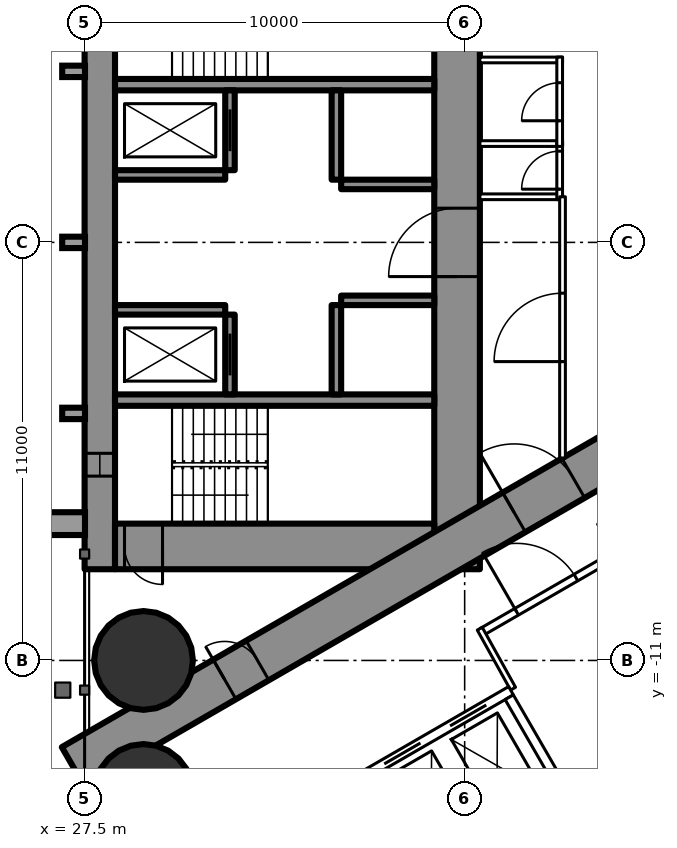
"""IFC4 building model, lengths in metres.
Left out: names, types, materials, properties, quantities, classifications, styles, units other than length and angle.
Written with IfcOpenShell. Run it as: python <this file> out.ifc"""

import sys

from ifc_helpers import new_model, si_unit, direction, frame, frame_2d, origin, origin_2d, place, context, subcontext, project, spatial, rectangle, hollow_circle, extrude, element, fill, save


model = new_model("IFC4")
c1 = context("Model", 3, precision=1e-05, world=origin(), true_north=direction((0.0, 1.0)))
c2 = subcontext(c1, "Body", "Model", "MODEL_VIEW")
j1 = project(units=[si_unit("LENGTHUNIT", "METRE"), si_unit("PLANEANGLEUNIT", "RADIAN")], contexts=[c1])
p1 = place(None, origin())
s1 = spatial("IfcSite", under=j1, at=p1, CompositionType="ELEMENT")
p2 = place(p1, origin())
s2 = spatial("IfcBuilding", under=s1, at=p2, CompositionType="ELEMENT")
p3 = place(p2, frame((0.0, 0.0, 94.1)))
s3 = spatial("IfcBuildingStorey", under=s2, at=p3, CompositionType="ELEMENT", Elevation=94.1)
for number, where, z_axis, x_axis in (
    (1, (29.05, -11.0, 0.0), (0.0, 0.0, 1.0), (1.0, 0.0, 0.0)),
    (2, (29.05, -14.5, 0.0), (0.0, 0.0, 1.0), (1.0, 0.0, 0.0)),
):
    element("IfcColumn", number, at=place(p3, frame(where, z_axis=z_axis, x_axis=x_axis)), inside=s3, PredefinedType="COLUMN", context=c2, shape_type="SweptSolid", body=[
        extrude(hollow_circle(Radius=1.3, WallThickness=0.1, at=origin_2d()), origin(), (0.0, 0.0, 1.0), 3.5),
    ])
p4 = place(p3, frame((27.9, -8.6, 0.0), z_axis=(0.0, 0.0, 1.0), x_axis=(0.0, 1.0, 0.0)))
e3 = element("IfcWall", 3, at=p4, inside=s3, PredefinedType="SHEAR", context=c2, shape_type="SweptSolid", body=[
    extrude(rectangle(XDim=17.2, YDim=0.8, at=frame_2d((8.6, 0.0))), origin(), (0.0, 0.0, 1.0), 3.5),
])
p5 = place(p4, frame((2.45, 0.0, 0.6)))
e4 = element("IfcOpeningElement", 4, at=p5, cuts=e3, PredefinedType="OPENING", context=c2, shape_type="SweptSolid", body=[
    extrude(rectangle(XDim=0.6, YDim=2.1, at=frame_2d((0.3, 1.05))), frame((0.0, 0.41, 0.0), z_axis=(0.0, -1.0, 0.0), x_axis=(1.0, 0.0, 0.0)), (0.0, 0.0, 1.0), 0.82),
])
p6 = place(p4, frame((14.15, 0.0, 0.6)))
e5 = element("IfcOpeningElement", 5, at=p6, cuts=e3, PredefinedType="OPENING", context=c2, shape_type="SweptSolid", body=[
    extrude(rectangle(XDim=0.6, YDim=2.1, at=frame_2d((0.3, 1.05))), frame((0.0, 0.41, 0.0), z_axis=(0.0, -1.0, 0.0), x_axis=(1.0, 0.0, 0.0)), (0.0, 0.0, 1.0), 0.82),
])
p7 = place(p3, frame((37.3, -8.6, 0.0), z_axis=(0.0, 0.0, 1.0), x_axis=(0.0, 1.0, 0.0)))
e6 = element("IfcWall", 6, at=p7, inside=s3, PredefinedType="SHEAR", context=c2, shape_type="SweptSolid", body=[
    extrude(rectangle(XDim=17.2, YDim=1.2, at=frame_2d((8.6, 0.0))), origin(), (0.0, 0.0, 1.0), 3.5),
])
p8 = place(p7, frame((7.7, 0.0, 0.0)))
e7 = element("IfcOpeningElement", 7, at=p8, cuts=e6, PredefinedType="OPENING", context=c2, shape_type="SweptSolid", body=[
    extrude(rectangle(XDim=1.8, YDim=2.2, at=frame_2d((0.9, 1.1))), frame((0.0, 0.61, 0.0), z_axis=(0.0, -1.0, 0.0), x_axis=(1.0, 0.0, 0.0)), (0.0, 0.0, 1.0), 1.22),
])
p9 = place(p3, frame((28.3, -8.0, 0.0), z_axis=(0.0, 0.0, 1.0), x_axis=(1.0, 0.0, 0.0)))
e8 = element("IfcWall", 8, at=p9, inside=s3, PredefinedType="SHEAR", context=c2, shape_type="SweptSolid", body=[
    extrude(rectangle(XDim=8.4, YDim=1.2, at=frame_2d((4.2, 0.0))), origin(), (0.0, 0.0, 1.0), 3.5),
])
p10 = place(p9, frame((0.25, 0.0, 0.0)))
e9 = element("IfcOpeningElement", 9, at=p10, cuts=e8, PredefinedType="OPENING", context=c2, shape_type="SweptSolid", body=[
    extrude(rectangle(XDim=1.0, YDim=2.2, at=frame_2d((0.5, 1.1))), frame((0.0, 0.61, 0.0), z_axis=(0.0, -1.0, 0.0), x_axis=(1.0, 0.0, 0.0)), (0.0, 0.0, 1.0), 1.22),
])
for number, where, z_axis, x_axis in (
    (10, (28.3, -4.15, 0.0), (0.0, 0.0, 1.0), (1.0, 0.0, 0.0)),
    (11, (28.3, 4.15, 0.0), (0.0, 0.0, 1.0), (1.0, 0.0, 0.0)),
):
    element("IfcWall", number, at=place(p3, frame(where, z_axis=z_axis, x_axis=x_axis)), inside=s3, PredefinedType="SHEAR", context=c2, shape_type="SweptSolid", body=[
        extrude(rectangle(XDim=8.4, YDim=0.3, at=frame_2d((4.2, 0.0))), origin(), (0.0, 0.0, 1.0), 3.5),
    ])
p11 = place(p3, frame((31.325, -4.0, 0.0), z_axis=(0.0, 0.0, 1.0), x_axis=(0.0, 1.0, 0.0)))
e12 = element("IfcWall", 12, at=p11, inside=s3, PredefinedType="SHEAR", context=c2, shape_type="SweptSolid", body=[
    extrude(rectangle(XDim=2.1, YDim=0.25, at=frame_2d((1.05, 0.0))), origin(), (0.0, 0.0, 1.0), 3.5),
])
p12 = place(p11, frame((0.5, 0.0, 0.0)))
e13 = element("IfcOpeningElement", 13, at=p12, cuts=e12, PredefinedType="OPENING", context=c2, shape_type="SweptSolid", body=[
    extrude(rectangle(XDim=1.1, YDim=2.2, at=frame_2d((0.55, 1.1))), frame((0.0, 0.135, 0.0), z_axis=(0.0, -1.0, 0.0), x_axis=(1.0, 0.0, 0.0)), (0.0, 0.0, 1.0), 0.27),
])
p13 = place(p3, frame((34.125, -4.0, 0.0), z_axis=(0.0, 0.0, 1.0), x_axis=(0.0, 1.0, 0.0)))
e14 = element("IfcWall", 14, at=p13, inside=s3, PredefinedType="SHEAR", context=c2, shape_type="SweptSolid", body=[
    extrude(rectangle(XDim=2.35, YDim=0.25, at=frame_2d((1.175, 0.0))), origin(), (0.0, 0.0, 1.0), 3.5),
])
p14 = place(p3, frame((28.3, -1.775, 0.0), z_axis=(0.0, 0.0, 1.0), x_axis=(1.0, 0.0, 0.0)))
e15 = element("IfcWall", 15, at=p14, inside=s3, PredefinedType="SHEAR", context=c2, shape_type="SweptSolid", body=[
    extrude(rectangle(XDim=2.9, YDim=0.25, at=frame_2d((1.45, 0.0))), origin(), (0.0, 0.0, 1.0), 3.5),
])
p15 = place(p3, frame((34.25, -1.525, 0.0), z_axis=(0.0, 0.0, 1.0), x_axis=(1.0, 0.0, 0.0)))
e16 = element("IfcWall", 16, at=p15, inside=s3, PredefinedType="SHEAR", context=c2, shape_type="SweptSolid", body=[
    extrude(rectangle(XDim=2.45, YDim=0.25, at=frame_2d((1.225, 0.0))), origin(), (0.0, 0.0, 1.0), 3.5),
])
p16 = place(p3, frame((31.325, 1.9, 0.0), z_axis=(0.0, 0.0, 1.0), x_axis=(0.0, 1.0, 0.0)))
e17 = element("IfcWall", 17, at=p16, inside=s3, PredefinedType="SHEAR", context=c2, shape_type="SweptSolid", body=[
    extrude(rectangle(XDim=2.1, YDim=0.25, at=frame_2d((1.05, 0.0))), origin(), (0.0, 0.0, 1.0), 3.5),
])
p17 = place(p16, frame((0.5, 0.0, 0.0)))
e18 = element("IfcOpeningElement", 18, at=p17, cuts=e17, PredefinedType="OPENING", context=c2, shape_type="SweptSolid", body=[
    extrude(rectangle(XDim=1.1, YDim=2.2, at=frame_2d((0.55, 1.1))), frame((0.0, 0.135, 0.0), z_axis=(0.0, -1.0, 0.0), x_axis=(1.0, 0.0, 0.0)), (0.0, 0.0, 1.0), 0.27),
])
p18 = place(p3, frame((34.125, 1.65, 0.0), z_axis=(0.0, 0.0, 1.0), x_axis=(0.0, 1.0, 0.0)))
e19 = element("IfcWall", 19, at=p18, inside=s3, PredefinedType="SHEAR", context=c2, shape_type="SweptSolid", body=[
    extrude(rectangle(XDim=2.35, YDim=0.25, at=frame_2d((1.175, 0.0))), origin(), (0.0, 0.0, 1.0), 3.5),
])
p19 = place(p3, frame((28.3, 1.775, 0.0), z_axis=(0.0, 0.0, 1.0), x_axis=(1.0, 0.0, 0.0)))
e20 = element("IfcWall", 20, at=p19, inside=s3, PredefinedType="SHEAR", context=c2, shape_type="SweptSolid", body=[
    extrude(rectangle(XDim=2.9, YDim=0.25, at=frame_2d((1.45, 0.0))), origin(), (0.0, 0.0, 1.0), 3.5),
])
p20 = place(p3, frame((34.25, 1.525, 0.0), z_axis=(0.0, 0.0, 1.0), x_axis=(1.0, 0.0, 0.0)))
e21 = element("IfcWall", 21, at=p20, inside=s3, PredefinedType="SHEAR", context=c2, shape_type="SweptSolid", body=[
    extrude(rectangle(XDim=2.45, YDim=0.25, at=frame_2d((1.225, 0.0))), origin(), (0.0, 0.0, 1.0), 3.5),
])
p21 = place(p3, frame((27.2, -13.8, 0.0), z_axis=(0.0, 0.0, 1.0), x_axis=(0.866027159892, 0.499996958321, 0.0)))
e22 = element("IfcWall", 22, at=p21, inside=s3, PredefinedType="SHEAR", context=c2, shape_type="SweptSolid", body=[
    extrude(rectangle(XDim=27.947, YDim=1.2, at=frame_2d((13.973, 0.0))), origin(), (0.0, 0.0, 1.0), 3.5),
])
p22 = place(p21, frame((4.6, 0.0, 0.0)))
e23 = element("IfcOpeningElement", 23, at=p22, cuts=e22, PredefinedType="OPENING", context=c2, shape_type="SweptSolid", body=[
    extrude(rectangle(XDim=1.0, YDim=2.2, at=frame_2d((0.5, 1.1))), frame((0.0, 0.61, 0.0), z_axis=(0.0, -1.0, 0.0), x_axis=(1.0, 0.0, 0.0)), (0.0, 0.0, 1.0), 1.22),
])
p23 = place(p21, frame((13.395, 0.0, 0.0)))
e24 = element("IfcOpeningElement", 24, at=p23, cuts=e22, PredefinedType="OPENING", context=c2, shape_type="SweptSolid", body=[
    extrude(rectangle(XDim=1.8, YDim=2.2, at=frame_2d((0.9, 1.1))), frame((0.0, 0.61, 0.0), z_axis=(0.0, -1.0, 0.0), x_axis=(1.0, 0.0, 0.0)), (0.0, 0.0, 1.0), 1.22),
])
p24 = place(p3, frame((27.2, 13.8, 0.0), z_axis=(0.0, 0.0, 1.0), x_axis=(0.866024515034, -0.500001539357, 0.0)))
e25 = element("IfcWall", 25, at=p24, inside=s3, PredefinedType="SHEAR", context=c2, shape_type="SweptSolid", body=[
    extrude(rectangle(XDim=26.907, YDim=1.2, at=frame_2d((13.454, 0.0))), origin(), (0.0, 0.0, 1.0), 3.5),
])
p25 = place(p24, frame((4.6, 0.0, 0.0)))
e26 = element("IfcOpeningElement", 26, at=p25, cuts=e25, PredefinedType="OPENING", context=c2, shape_type="SweptSolid", body=[
    extrude(rectangle(XDim=1.0, YDim=2.2, at=frame_2d((0.5, 1.1))), frame((0.0, 0.61, 0.0), z_axis=(0.0, -1.0, 0.0), x_axis=(1.0, 0.0, 0.0)), (0.0, 0.0, 1.0), 1.22),
])
p26 = place(p24, frame((13.395, 0.0, 0.0)))
e27 = element("IfcOpeningElement", 27, at=p26, cuts=e25, PredefinedType="OPENING", context=c2, shape_type="SweptSolid", body=[
    extrude(rectangle(XDim=1.8, YDim=2.2, at=frame_2d((0.9, 1.1))), frame((0.0, 0.61, 0.0), z_axis=(0.0, -1.0, 0.0), x_axis=(1.0, 0.0, 0.0)), (0.0, 0.0, 1.0), 1.22),
])
p27 = place(p3, frame((37.96, -10.243, 0.0), z_axis=(0.0, 0.0, 1.0), x_axis=(0.866026429433, 0.499998223521, 0.0)))
e28 = element("IfcWall", 28, at=p27, inside=s3, PredefinedType="PARTITIONING", context=c2, shape_type="SweptSolid", body=[
    extrude(rectangle(XDim=20.487, YDim=0.2, at=frame_2d((10.243, 0.0))), origin(), (0.0, 0.0, 1.0), 3.25),
])
p28 = place(p27, frame((4.047, 0.0, 0.0)))
e29 = element("IfcOpeningElement", 29, at=p28, cuts=e28, PredefinedType="OPENING", context=c2, shape_type="SweptSolid", body=[
    extrude(rectangle(XDim=0.95, YDim=2.2, at=frame_2d((0.475, 1.1))), frame((0.0, 0.11, 0.0), z_axis=(0.0, -1.0, 0.0), x_axis=(1.0, 0.0, 0.0)), (0.0, 0.0, 1.0), 0.22),
])
p29 = place(p27, frame((11.04, 0.0, 0.0)))
e30 = element("IfcOpeningElement", 30, at=p29, cuts=e28, PredefinedType="OPENING", context=c2, shape_type="SweptSolid", body=[
    extrude(rectangle(XDim=0.95, YDim=2.2, at=frame_2d((0.475, 1.1))), frame((0.0, 0.11, 0.0), z_axis=(0.0, -1.0, 0.0), x_axis=(1.0, 0.0, 0.0)), (0.0, 0.0, 1.0), 0.22),
])
p30 = place(p27, frame((13.035, 0.0, 0.0)))
e31 = element("IfcOpeningElement", 31, at=p30, cuts=e28, PredefinedType="OPENING", context=c2, shape_type="SweptSolid", body=[
    extrude(rectangle(XDim=0.95, YDim=2.2, at=frame_2d((0.475, 1.1))), frame((0.0, 0.11, 0.0), z_axis=(0.0, -1.0, 0.0), x_axis=(1.0, 0.0, 0.0)), (0.0, 0.0, 1.0), 0.22),
])
p31 = place(p27, frame((17.085, 0.0, 0.0)))
e32 = element("IfcOpeningElement", 32, at=p31, cuts=e28, PredefinedType="OPENING", context=c2, shape_type="SweptSolid", body=[
    extrude(rectangle(XDim=0.95, YDim=2.2, at=frame_2d((0.475, 1.1))), frame((0.0, 0.11, 0.0), z_axis=(0.0, -1.0, 0.0), x_axis=(1.0, 0.0, 0.0)), (0.0, 0.0, 1.0), 0.22),
])
p32 = place(p27, frame((1.048, 0.0, 0.0)))
e33 = element("IfcOpeningElement", 33, at=p32, cuts=e28, PredefinedType="OPENING", context=c2, shape_type="SweptSolid", body=[
    extrude(rectangle(XDim=1.8, YDim=2.2, at=frame_2d((0.9, 1.1))), frame((0.0, 0.11, 0.0), z_axis=(0.0, -1.0, 0.0), x_axis=(1.0, 0.0, 0.0)), (0.0, 0.0, 1.0), 0.22),
])
p33 = place(p3, frame((36.834, 10.894, 0.0), z_axis=(0.0, 0.0, 1.0), x_axis=(0.866028157229, -0.499995230863, 0.0)))
e34 = element("IfcWall", 34, at=p33, inside=s3, PredefinedType="PARTITIONING", context=c2, shape_type="SweptSolid", body=[
    extrude(rectangle(XDim=21.667, YDim=0.2, at=frame_2d((10.833, 0.0))), origin(), (0.0, 0.0, 1.0), 3.25),
])
p34 = place(p33, frame((14.04, 0.0, 0.0)))
e35 = element("IfcOpeningElement", 35, at=p34, cuts=e34, PredefinedType="OPENING", context=c2, shape_type="SweptSolid", body=[
    extrude(rectangle(XDim=0.95, YDim=2.2, at=frame_2d((0.475, 1.1))), frame((0.0, 0.11, 0.0), z_axis=(0.0, -1.0, 0.0), x_axis=(1.0, 0.0, 0.0)), (0.0, 0.0, 1.0), 0.22),
])
p35 = place(p33, frame((9.99, 0.0, 0.0)))
e36 = element("IfcOpeningElement", 36, at=p35, cuts=e34, PredefinedType="OPENING", context=c2, shape_type="SweptSolid", body=[
    extrude(rectangle(XDim=0.95, YDim=2.2, at=frame_2d((0.475, 1.1))), frame((0.0, 0.11, 0.0), z_axis=(0.0, -1.0, 0.0), x_axis=(1.0, 0.0, 0.0)), (0.0, 0.0, 1.0), 0.22),
])
p36 = place(p33, frame((3.35, 0.0, 0.0)))
e37 = element("IfcOpeningElement", 37, at=p36, cuts=e34, PredefinedType="OPENING", context=c2, shape_type="SweptSolid", body=[
    extrude(rectangle(XDim=1.0, YDim=2.2, at=frame_2d((0.5, 1.1))), frame((0.0, 0.11, 0.0), z_axis=(0.0, -1.0, 0.0), x_axis=(1.0, 0.0, 0.0)), (0.0, 0.0, 1.0), 0.22),
])
p37 = place(p3, frame((38.773, -11.742, 0.0), z_axis=(0.0, 0.0, 1.0), x_axis=(-0.485528096672, 0.8742210632, 0.0)))
e38 = element("IfcWall", 38, at=p37, inside=s3, PredefinedType="PARTITIONING", context=c2, shape_type="SweptSolid", body=[
    extrude(rectangle(XDim=1.805, YDim=0.15, at=frame_2d((0.903, 0.0))), origin(), (0.0, 0.0, 1.0), 3.25),
])
for number, where, z_axis, x_axis in (
    (39, (37.9, 1.2, 0.0), (0.0, 0.0, 1.0), (1.0, 0.0, 0.0)),
    (40, (37.9, 2.6, 0.0), (0.0, 0.0, 1.0), (1.0, 0.0, 0.0)),
    (41, (37.9, 4.8, 0.0), (0.0, 0.0, 1.0), (1.0, 0.0, 0.0)),
):
    element("IfcWall", number, at=place(p3, frame(where, z_axis=z_axis, x_axis=x_axis)), inside=s3, PredefinedType="PARTITIONING", context=c2, shape_type="SweptSolid", body=[
        extrude(rectangle(XDim=2.175, YDim=0.15, at=frame_2d((1.087, 0.0))), origin(), (0.0, 0.0, 1.0), 3.25),
    ])
p38 = place(p3, frame((40.0, 1.125, 0.0), z_axis=(0.0, 0.0, 1.0), x_axis=(0.0, 1.0, 0.0)))
e42 = element("IfcWall", 42, at=p38, inside=s3, PredefinedType="PARTITIONING", context=c2, shape_type="SweptSolid", body=[
    extrude(rectangle(XDim=1.55, YDim=0.15, at=frame_2d((0.775, 0.0))), origin(), (0.0, 0.0, 1.0), 3.25),
])
p39 = place(p38, frame((0.275, 0.0, 0.0)))
e43 = element("IfcOpeningElement", 43, at=p39, cuts=e42, PredefinedType="OPENING", context=c2, shape_type="SweptSolid", body=[
    extrude(rectangle(XDim=1.0, YDim=2.2, at=frame_2d((0.5, 1.1))), frame((0.0, 0.085, 0.0), z_axis=(0.0, -1.0, 0.0), x_axis=(1.0, 0.0, 0.0)), (0.0, 0.0, 1.0), 0.17),
])
p40 = place(p3, frame((40.0, 2.525, 0.0), z_axis=(0.0, 0.0, 1.0), x_axis=(0.0, 1.0, 0.0)))
e44 = element("IfcWall", 44, at=p40, inside=s3, PredefinedType="PARTITIONING", context=c2, shape_type="SweptSolid", body=[
    extrude(rectangle(XDim=2.35, YDim=0.15, at=frame_2d((1.175, 0.0))), origin(), (0.0, 0.0, 1.0), 3.25),
])
p41 = place(p40, frame((0.675, 0.0, 0.0)))
e45 = element("IfcOpeningElement", 45, at=p41, cuts=e44, PredefinedType="OPENING", context=c2, shape_type="SweptSolid", body=[
    extrude(rectangle(XDim=1.0, YDim=2.2, at=frame_2d((0.5, 1.1))), frame((0.0, 0.085, 0.0), z_axis=(0.0, -1.0, 0.0), x_axis=(1.0, 0.0, 0.0)), (0.0, 0.0, 1.0), 0.17),
])
p42 = place(p3, frame((40.075, -5.674, 0.0), z_axis=(0.0, 0.0, 1.0), x_axis=(0.0, 1.0, 0.0)))
e46 = element("IfcWall", 46, at=p42, inside=s3, PredefinedType="PARTITIONING", context=c2, shape_type="SweptSolid", body=[
    extrude(rectangle(XDim=6.874, YDim=0.15, at=frame_2d((3.437, 0.0))), origin(), (0.0, 0.0, 1.0), 3.25),
])
p43 = place(p42, frame((2.537, 0.0, 0.0)))
e47 = element("IfcOpeningElement", 47, at=p43, cuts=e46, PredefinedType="OPENING", context=c2, shape_type="SweptSolid", body=[
    extrude(rectangle(XDim=1.8, YDim=2.2, at=frame_2d((0.9, 1.1))), frame((0.0, 0.085, 0.0), z_axis=(0.0, -1.0, 0.0), x_axis=(1.0, 0.0, 0.0)), (0.0, 0.0, 1.0), 0.17),
])
p44 = place(p3, frame((31.271, -16.097, 0.0), z_axis=(0.0, 0.0, 1.0), x_axis=(0.86604045752, 0.499973925258, 0.0)))
e48 = element("IfcWall", 48, at=p44, inside=s3, PredefinedType="PARTITIONING", context=c2, shape_type="SweptSolid", body=[
    extrude(rectangle(XDim=8.6, YDim=0.25, at=frame_2d((4.3, 0.0))), origin(), (0.0, 0.0, 1.0), 3.25),
])
p45 = place(p44, frame((0.75, 0.0, 0.0)))
e49 = element("IfcOpeningElement", 49, at=p45, cuts=e48, PredefinedType="OPENING", context=c2, shape_type="SweptSolid", body=[
    extrude(rectangle(XDim=1.1, YDim=2.2, at=frame_2d((0.55, 1.1))), frame((0.0, 0.135, 0.0), z_axis=(0.0, -1.0, 0.0), x_axis=(1.0, 0.0, 0.0)), (0.0, 0.0, 1.0), 0.27),
])
p46 = place(p44, frame((2.75, 0.0, 0.0)))
e50 = element("IfcOpeningElement", 50, at=p46, cuts=e48, PredefinedType="OPENING", context=c2, shape_type="SweptSolid", body=[
    extrude(rectangle(XDim=1.1, YDim=2.2, at=frame_2d((0.55, 1.1))), frame((0.0, 0.135, 0.0), z_axis=(0.0, -1.0, 0.0), x_axis=(1.0, 0.0, 0.0)), (0.0, 0.0, 1.0), 0.27),
])
p47 = place(p44, frame((4.75, 0.0, 0.0)))
e51 = element("IfcOpeningElement", 51, at=p47, cuts=e48, PredefinedType="OPENING", context=c2, shape_type="SweptSolid", body=[
    extrude(rectangle(XDim=1.1, YDim=2.2, at=frame_2d((0.55, 1.1))), frame((0.0, 0.135, 0.0), z_axis=(0.0, -1.0, 0.0), x_axis=(1.0, 0.0, 0.0)), (0.0, 0.0, 1.0), 0.27),
])
p48 = place(p44, frame((6.75, 0.0, 0.0)))
e52 = element("IfcOpeningElement", 52, at=p48, cuts=e48, PredefinedType="OPENING", context=c2, shape_type="SweptSolid", body=[
    extrude(rectangle(XDim=1.1, YDim=2.2, at=frame_2d((0.55, 1.1))), frame((0.0, 0.135, 0.0), z_axis=(0.0, -1.0, 0.0), x_axis=(1.0, 0.0, 0.0)), (0.0, 0.0, 1.0), 0.27),
])
p49 = place(p3, frame((38.673, -11.968, 0.0), z_axis=(0.0, 0.0, 1.0), x_axis=(0.499929347863, -0.866066190972, 0.0)))
e53 = element("IfcWall", 53, at=p49, inside=s3, PredefinedType="PARTITIONING", context=c2, shape_type="SweptSolid", body=[
    extrude(rectangle(XDim=3.201, YDim=0.25, at=frame_2d((1.6, 0.0))), origin(), (0.0, 0.0, 1.0), 3.25),
])
p50 = place(p32, origin())
e54 = element("IfcDoor", 54, at=p50, inside=s3, OperationType="DOUBLE_DOOR_SINGLE_SWING", PredefinedType="DOOR", context=c2, shape_type="SweptSolid", body=[
    extrude(rectangle(XDim=1.8, YDim=2.2, at=frame_2d((0.9, 1.1))), frame((0.0, 0.025, 0.0), z_axis=(0.0, -1.0, 0.0), x_axis=(1.0, 0.0, 0.0)), (0.0, 0.0, 1.0), 0.05),
])
fill(e33, e54)
p51 = place(p39, origin())
e55 = element("IfcDoor", 55, at=p51, inside=s3, OperationType="SINGLE_SWING_LEFT", PredefinedType="DOOR", context=c2, shape_type="SweptSolid", body=[
    extrude(rectangle(XDim=1.0, YDim=2.2, at=frame_2d((0.5, 1.1))), frame((0.0, 0.025, 0.0), z_axis=(0.0, -1.0, 0.0), x_axis=(1.0, 0.0, 0.0)), (0.0, 0.0, 1.0), 0.05),
])
fill(e43, e55)
p52 = place(p41, origin())
e56 = element("IfcDoor", 56, at=p52, inside=s3, OperationType="SINGLE_SWING_LEFT", PredefinedType="DOOR", context=c2, shape_type="SweptSolid", body=[
    extrude(rectangle(XDim=1.0, YDim=2.2, at=frame_2d((0.5, 1.1))), frame((0.0, 0.025, 0.0), z_axis=(0.0, -1.0, 0.0), x_axis=(1.0, 0.0, 0.0)), (0.0, 0.0, 1.0), 0.05),
])
fill(e45, e56)
p53 = place(p43, origin())
e57 = element("IfcDoor", 57, at=p53, inside=s3, OperationType="DOUBLE_DOOR_SINGLE_SWING", PredefinedType="DOOR", context=c2, shape_type="SweptSolid", body=[
    extrude(rectangle(XDim=1.8, YDim=2.2, at=frame_2d((0.9, 1.1))), frame((0.0, 0.025, 0.0), z_axis=(0.0, -1.0, 0.0), x_axis=(1.0, 0.0, 0.0)), (0.0, 0.0, 1.0), 0.05),
])
fill(e47, e57)
p54 = place(p22, origin())
e58 = element("IfcDoor", 58, at=p54, inside=s3, OperationType="SINGLE_SWING_LEFT", PredefinedType="DOOR", context=c2, shape_type="SweptSolid", body=[
    extrude(rectangle(XDim=1.0, YDim=2.2, at=frame_2d((0.5, 1.1))), frame((0.0, 0.025, 0.0), z_axis=(0.0, -1.0, 0.0), x_axis=(1.0, 0.0, 0.0)), (0.0, 0.0, 1.0), 0.05),
])
fill(e23, e58)
p55 = place(p23, origin())
e59 = element("IfcDoor", 59, at=p55, inside=s3, OperationType="DOUBLE_DOOR_SINGLE_SWING", PredefinedType="DOOR", context=c2, shape_type="SweptSolid", body=[
    extrude(rectangle(XDim=1.8, YDim=2.2, at=frame_2d((0.9, 1.1))), frame((0.0, 0.025, 0.0), z_axis=(0.0, -1.0, 0.0), x_axis=(1.0, 0.0, 0.0)), (0.0, 0.0, 1.0), 0.05),
])
fill(e24, e59)
p56 = place(p8, origin())
e60 = element("IfcDoor", 60, at=p56, inside=s3, OperationType="DOUBLE_DOOR_SINGLE_SWING", PredefinedType="DOOR", context=c2, shape_type="SweptSolid", body=[
    extrude(rectangle(XDim=1.8, YDim=2.2, at=frame_2d((0.9, 1.1))), frame((0.0, 0.025, 0.0), z_axis=(0.0, -1.0, 0.0), x_axis=(1.0, 0.0, 0.0)), (0.0, 0.0, 1.0), 0.05),
])
fill(e7, e60)
p57 = place(p10, origin())
e61 = element("IfcDoor", 61, at=p57, inside=s3, OperationType="SINGLE_SWING_RIGHT", PredefinedType="DOOR", context=c2, shape_type="SweptSolid", body=[
    extrude(rectangle(XDim=1.0, YDim=2.2, at=frame_2d((0.5, 1.1))), frame((0.0, 0.025, 0.0), z_axis=(0.0, -1.0, 0.0), x_axis=(1.0, 0.0, 0.0)), (0.0, 0.0, 1.0), 0.05),
])
fill(e9, e61)
p58 = place(p12, origin())
e62 = element("IfcDoor", 62, at=p58, inside=s3, OperationType="SLIDING_TO_LEFT", PredefinedType="USERDEFINED", context=c2, shape_type="SweptSolid", body=[
    extrude(rectangle(XDim=1.1, YDim=2.2, at=frame_2d((0.55, 1.1))), frame((0.0, 0.025, 0.0), z_axis=(0.0, -1.0, 0.0), x_axis=(1.0, 0.0, 0.0)), (0.0, 0.0, 1.0), 0.05),
])
fill(e13, e62)
p59 = place(p17, origin())
e63 = element("IfcDoor", 63, at=p59, inside=s3, OperationType="SLIDING_TO_LEFT", PredefinedType="USERDEFINED", context=c2, shape_type="SweptSolid", body=[
    extrude(rectangle(XDim=1.1, YDim=2.2, at=frame_2d((0.55, 1.1))), frame((0.0, 0.025, 0.0), z_axis=(0.0, -1.0, 0.0), x_axis=(1.0, 0.0, 0.0)), (0.0, 0.0, 1.0), 0.05),
])
fill(e18, e63)
p60 = place(p47, origin())
e64 = element("IfcDoor", 64, at=p60, inside=s3, OperationType="DOUBLE_DOOR_SLIDING", PredefinedType="USERDEFINED", context=c2, shape_type="SweptSolid", body=[
    extrude(rectangle(XDim=1.1, YDim=2.2, at=frame_2d((0.55, 1.1))), frame((0.0, 0.025, 0.0), z_axis=(0.0, -1.0, 0.0), x_axis=(1.0, 0.0, 0.0)), (0.0, 0.0, 1.0), 0.05),
])
fill(e51, e64)
p61 = place(p48, origin())
e65 = element("IfcDoor", 65, at=p61, inside=s3, OperationType="DOUBLE_DOOR_SLIDING", PredefinedType="USERDEFINED", context=c2, shape_type="SweptSolid", body=[
    extrude(rectangle(XDim=1.1, YDim=2.2, at=frame_2d((0.55, 1.1))), frame((0.0, 0.025, 0.0), z_axis=(0.0, -1.0, 0.0), x_axis=(1.0, 0.0, 0.0)), (0.0, 0.0, 1.0), 0.05),
])
fill(e52, e65)
p62 = place(p5, origin())
e66 = element("IfcWindow", 66, at=p62, inside=s3, PartitioningType="SINGLE_PANEL", PredefinedType="WINDOW", context=c2, shape_type="SweptSolid", body=[
    extrude(rectangle(XDim=0.6, YDim=2.1, at=frame_2d((0.3, 1.05))), frame((0.0, 0.03, 0.0), z_axis=(0.0, -1.0, 0.0), x_axis=(1.0, 0.0, 0.0)), (0.0, 0.0, 1.0), 0.06),
])
fill(e4, e66)
save(model, sys.argv[1])
